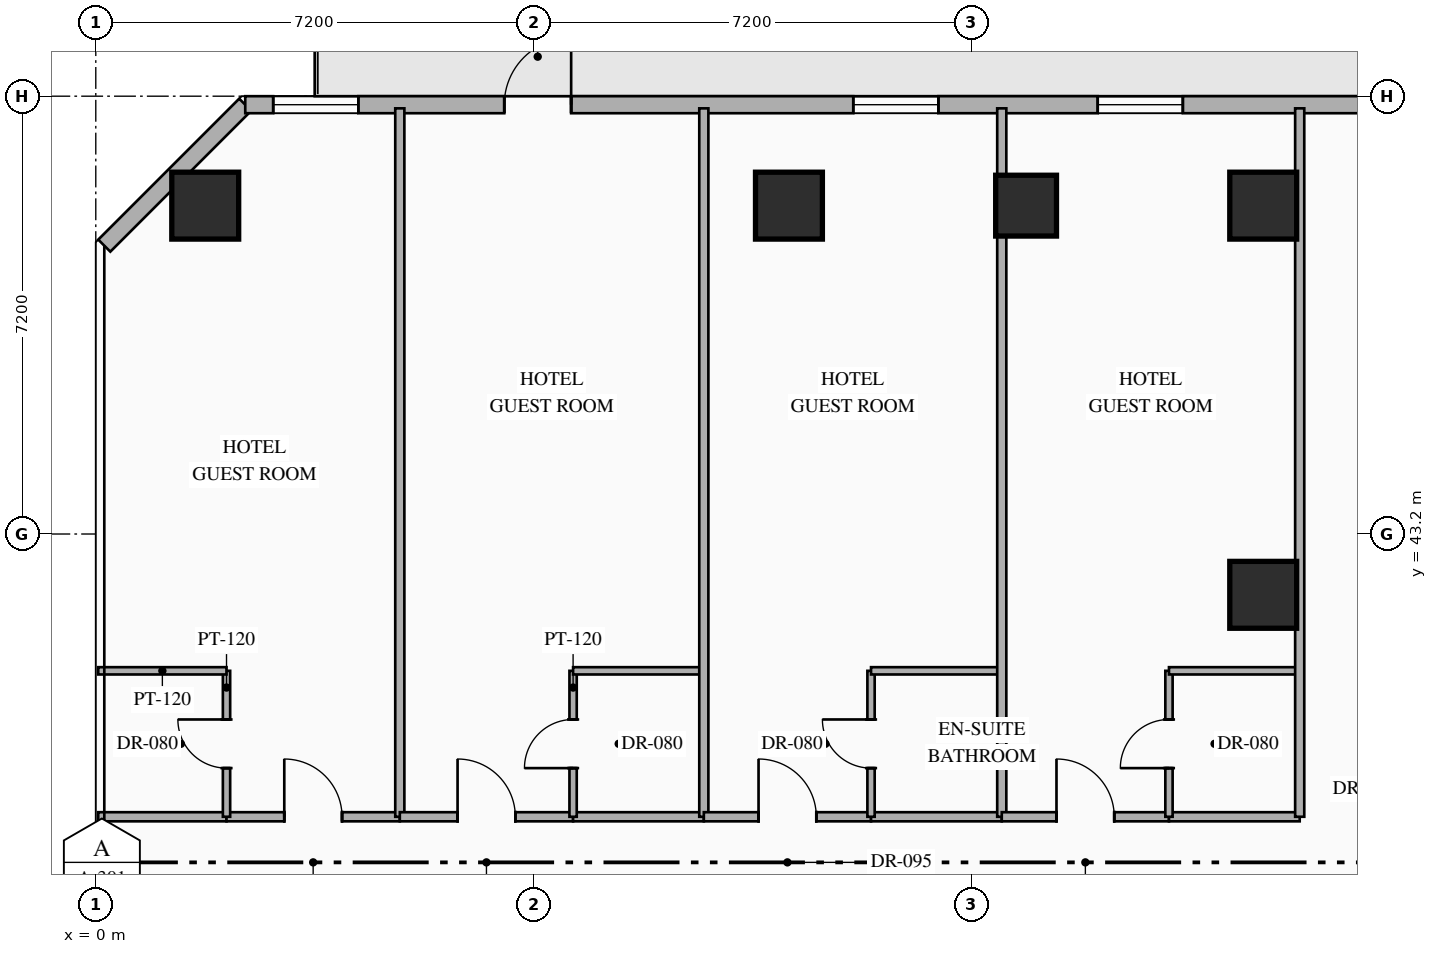
"""IFC4 building model, lengths in metres.
Left out: names, types, materials, properties, quantities, classifications, styles, units other than length and angle.
Written with IfcOpenShell. Run it as: python <this file> out.ifc"""

import sys

from ifc_helpers import new_model, si_unit, direction, frame, frame_2d, origin, origin_2d, place, context, subcontext, project, spatial, rectangle, hollow_rectangle, extrude, element, fill, save


model = new_model("IFC4")
c1 = context("Model", 3, precision=1e-05, world=origin(), true_north=direction((0.0, 1.0)))
c2 = subcontext(c1, "Body", "Model", "MODEL_VIEW")
j1 = project(units=[si_unit("LENGTHUNIT", "METRE"), si_unit("PLANEANGLEUNIT", "RADIAN")], contexts=[c1])
p1 = place(None, origin())
s1 = spatial("IfcSite", under=j1, at=p1, CompositionType="ELEMENT")
p2 = place(p1, origin())
s2 = spatial("IfcBuilding", under=s1, at=p2, CompositionType="ELEMENT")
p3 = place(p2, frame((0.0, 0.0, 46.65)))
s3 = spatial("IfcBuildingStorey", under=s2, at=p3, CompositionType="ELEMENT", Elevation=46.65)
for number, where, z_axis, x_axis in (
    (1, (1.8, 48.6, 0.0), (0.0, 0.0, 1.0), (1.0, 0.0, 0.0)),
    (2, (11.4, 48.6, 0.0), (0.0, 0.0, 1.0), (1.0, 0.0, 0.0)),
    (3, (19.2, 48.6, 0.0), (0.0, 0.0, 1.0), (1.0, 0.0, 0.0)),
    (4, (19.2, 42.2, 0.0), (0.0, 0.0, 1.0), (1.0, 0.0, 0.0)),
):
    element("IfcColumn", number, at=place(p3, frame(where, z_axis=z_axis, x_axis=x_axis)), inside=s3, PredefinedType="COLUMN", context=c2, shape_type="SweptSolid", body=[
        extrude(hollow_rectangle(XDim=1.1, YDim=1.1, WallThickness=0.04, at=origin_2d()), origin(), (0.0, 0.0, 1.0), 3.35),
    ])
p4 = place(p3, frame((15.3, 48.6, 0.0), z_axis=(0.0, 0.0, 1.0), x_axis=(1.0, 0.0, 0.0)))
e5 = element("IfcColumn", 5, at=p4, inside=s3, PredefinedType="COLUMN", context=c2, shape_type="SweptSolid", body=[
    extrude(hollow_rectangle(XDim=1.0, YDim=1.0, WallThickness=0.038, at=origin_2d()), origin(), (0.0, 0.0, 1.0), 3.35),
])
p5 = place(p3, frame((0.14, 47.942, 0.0), z_axis=(0.0, 0.0, 1.0), x_axis=(0.707106781187, 0.707106781187, 0.0)))
e6 = element("IfcWall", 6, at=p5, inside=s3, PredefinedType="STANDARD", context=c2, shape_type="SweptSolid", body=[
    extrude(rectangle(XDim=3.278, YDim=0.28, at=frame_2d((1.639, 0.0))), origin(), (0.0, 0.0, 1.0), 3.13),
])
p6 = place(p3, frame((2.458, 50.26, 0.0), z_axis=(0.0, 0.0, 1.0), x_axis=(1.0, 0.0, 0.0)))
e7 = element("IfcWall", 7, at=p6, inside=s3, PredefinedType="STANDARD", context=c2, shape_type="SweptSolid", body=[
    extrude(rectangle(XDim=40.084, YDim=0.28, at=frame_2d((20.042, 0.0))), origin(), (0.0, 0.0, 1.0), 3.13),
])
p7 = place(p6, frame((4.26, 0.0, 0.0)))
e8 = element("IfcOpeningElement", 8, at=p7, cuts=e7, PredefinedType="OPENING", context=c2, shape_type="SweptSolid", body=[
    extrude(rectangle(XDim=1.1, YDim=2.2, at=frame_2d((0.55, 1.1))), frame((0.0, 0.15, 0.0), z_axis=(0.0, -1.0, 0.0), x_axis=(1.0, 0.0, 0.0)), (0.0, 0.0, 1.0), 0.3),
])
p8 = place(p6, frame((0.46, 0.0, 0.85)))
e9 = element("IfcOpeningElement", 9, at=p8, cuts=e7, PredefinedType="OPENING", context=c2, shape_type="SweptSolid", body=[
    extrude(rectangle(XDim=1.4, YDim=1.8, at=frame_2d((0.7, 0.9))), frame((0.0, 0.15, 0.0), z_axis=(0.0, -1.0, 0.0), x_axis=(1.0, 0.0, 0.0)), (0.0, 0.0, 1.0), 0.3),
])
p9 = place(p6, frame((10.0, 0.0, 0.85)))
e10 = element("IfcOpeningElement", 10, at=p9, cuts=e7, PredefinedType="OPENING", context=c2, shape_type="SweptSolid", body=[
    extrude(rectangle(XDim=1.4, YDim=1.8, at=frame_2d((0.7, 0.9))), frame((0.0, 0.15, 0.0), z_axis=(0.0, -1.0, 0.0), x_axis=(1.0, 0.0, 0.0)), (0.0, 0.0, 1.0), 0.3),
])
p10 = place(p6, frame((14.02, 0.0, 0.85)))
e11 = element("IfcOpeningElement", 11, at=p10, cuts=e7, PredefinedType="OPENING", context=c2, shape_type="SweptSolid", body=[
    extrude(rectangle(XDim=1.4, YDim=1.8, at=frame_2d((0.7, 0.9))), frame((0.0, 0.15, 0.0), z_axis=(0.0, -1.0, 0.0), x_axis=(1.0, 0.0, 0.0)), (0.0, 0.0, 1.0), 0.3),
])
p11 = place(p6, frame((20.789, 0.0, 0.85)))
e12 = element("IfcOpeningElement", 12, at=p11, cuts=e7, PredefinedType="OPENING", context=c2, shape_type="SweptSolid", body=[
    extrude(rectangle(XDim=1.4, YDim=1.8, at=frame_2d((0.7, 0.9))), frame((0.0, 0.15, 0.0), z_axis=(0.0, -1.0, 0.0), x_axis=(1.0, 0.0, 0.0)), (0.0, 0.0, 1.0), 0.3),
])
p12 = place(p6, frame((24.664, 0.0, 0.85)))
e13 = element("IfcOpeningElement", 13, at=p12, cuts=e7, PredefinedType="OPENING", context=c2, shape_type="SweptSolid", body=[
    extrude(rectangle(XDim=1.4, YDim=1.8, at=frame_2d((0.7, 0.9))), frame((0.0, 0.15, 0.0), z_axis=(0.0, -1.0, 0.0), x_axis=(1.0, 0.0, 0.0)), (0.0, 0.0, 1.0), 0.3),
])
p13 = place(p6, frame((26.803, 0.0, 0.85)))
e14 = element("IfcOpeningElement", 14, at=p13, cuts=e7, PredefinedType="OPENING", context=c2, shape_type="SweptSolid", body=[
    extrude(rectangle(XDim=1.4, YDim=1.8, at=frame_2d((0.7, 0.9))), frame((0.0, 0.15, 0.0), z_axis=(0.0, -1.0, 0.0), x_axis=(1.0, 0.0, 0.0)), (0.0, 0.0, 1.0), 0.3),
])
p14 = place(p6, frame((32.703, 0.0, 0.85)))
e15 = element("IfcOpeningElement", 15, at=p14, cuts=e7, PredefinedType="OPENING", context=c2, shape_type="SweptSolid", body=[
    extrude(rectangle(XDim=1.4, YDim=1.8, at=frame_2d((0.7, 0.9))), frame((0.0, 0.15, 0.0), z_axis=(0.0, -1.0, 0.0), x_axis=(1.0, 0.0, 0.0)), (0.0, 0.0, 1.0), 0.3),
])
p15 = place(p6, frame((36.967, 0.0, 0.85)))
e16 = element("IfcOpeningElement", 16, at=p15, cuts=e7, PredefinedType="OPENING", context=c2, shape_type="SweptSolid", body=[
    extrude(rectangle(XDim=1.4, YDim=1.8, at=frame_2d((0.7, 0.9))), frame((0.0, 0.15, 0.0), z_axis=(0.0, -1.0, 0.0), x_axis=(1.0, 0.0, 0.0)), (0.0, 0.0, 1.0), 0.3),
])
p16 = place(p3, frame((0.04, 38.55, 0.0), z_axis=(0.0, 0.0, 1.0), x_axis=(1.0, 0.0, 0.0)))
e17 = element("IfcWall", 17, at=p16, inside=s3, PredefinedType="PARTITIONING", context=c2, shape_type="SweptSolid", body=[
    extrude(rectangle(XDim=2.11, YDim=0.15, at=frame_2d((1.055, 0.0))), origin(), (0.0, 0.0, 1.0), 2.775),
])
p17 = place(p3, frame((2.15, 38.55, 0.0), z_axis=(0.0, 0.0, 1.0), x_axis=(1.0, 0.0, 0.0)))
e18 = element("IfcWall", 18, at=p17, inside=s3, PredefinedType="PARTITIONING", context=c2, shape_type="SweptSolid", body=[
    extrude(rectangle(XDim=2.85, YDim=0.15, at=frame_2d((1.425, 0.0))), origin(), (0.0, 0.0, 1.0), 2.775),
])
p18 = place(p17, frame((0.95, 0.0, 0.0)))
e19 = element("IfcOpeningElement", 19, at=p18, cuts=e18, PredefinedType="OPENING", context=c2, shape_type="SweptSolid", body=[
    extrude(rectangle(XDim=0.95, YDim=2.15, at=frame_2d((0.475, 1.075))), frame((0.0, 0.085, 0.0), z_axis=(0.0, -1.0, 0.0), x_axis=(1.0, 0.0, 0.0)), (0.0, 0.0, 1.0), 0.17),
])
p19 = place(p3, frame((2.15, 38.55, 0.0), z_axis=(0.0, 0.0, 1.0), x_axis=(0.0, 1.0, 0.0)))
e20 = element("IfcWall", 20, at=p19, inside=s3, PredefinedType="PARTITIONING", context=c2, shape_type="SweptSolid", body=[
    extrude(rectangle(XDim=2.4, YDim=0.12, at=frame_2d((1.2, 0.0))), origin(), (0.0, 0.0, 1.0), 3.13),
])
p20 = place(p19, frame((0.8, 0.0, 0.0)))
e21 = element("IfcOpeningElement", 21, at=p20, cuts=e20, PredefinedType="OPENING", context=c2, shape_type="SweptSolid", body=[
    extrude(rectangle(XDim=0.8, YDim=2.06, at=frame_2d((0.4, 1.03))), frame((0.0, 0.07, 0.0), z_axis=(0.0, -1.0, 0.0), x_axis=(1.0, 0.0, 0.0)), (0.0, 0.0, 1.0), 0.14),
])
p21 = place(p3, frame((0.04, 40.95, 0.0), z_axis=(0.0, 0.0, 1.0), x_axis=(1.0, 0.0, 0.0)))
e22 = element("IfcWall", 22, at=p21, inside=s3, PredefinedType="PARTITIONING", context=c2, shape_type="SweptSolid", body=[
    extrude(rectangle(XDim=2.11, YDim=0.12, at=frame_2d((1.055, 0.0))), origin(), (0.0, 0.0, 1.0), 2.775),
])
p22 = place(p3, frame((5.0, 38.55, 0.0), z_axis=(0.0, 0.0, 1.0), x_axis=(0.0, 1.0, 0.0)))
e23 = element("IfcWall", 23, at=p22, inside=s3, PredefinedType="PARTITIONING", context=c2, shape_type="SweptSolid", body=[
    extrude(rectangle(XDim=11.65, YDim=0.15, at=frame_2d((5.825, 0.0))), origin(), (0.0, 0.0, 1.0), 3.13),
])
p23 = place(p3, frame((5.0, 38.55, 0.0), z_axis=(0.0, 0.0, 1.0), x_axis=(1.0, 0.0, 0.0)))
e24 = element("IfcWall", 24, at=p23, inside=s3, PredefinedType="PARTITIONING", context=c2, shape_type="SweptSolid", body=[
    extrude(rectangle(XDim=2.85, YDim=0.15, at=frame_2d((1.425, 0.0))), origin(), (0.0, 0.0, 1.0), 2.775),
])
p24 = place(p23, frame((0.95, 0.0, 0.0)))
e25 = element("IfcOpeningElement", 25, at=p24, cuts=e24, PredefinedType="OPENING", context=c2, shape_type="SweptSolid", body=[
    extrude(rectangle(XDim=0.95, YDim=2.15, at=frame_2d((0.475, 1.075))), frame((0.0, 0.085, 0.0), z_axis=(0.0, -1.0, 0.0), x_axis=(1.0, 0.0, 0.0)), (0.0, 0.0, 1.0), 0.17),
])
p25 = place(p3, frame((7.85, 38.55, 0.0), z_axis=(0.0, 0.0, 1.0), x_axis=(1.0, 0.0, 0.0)))
e26 = element("IfcWall", 26, at=p25, inside=s3, PredefinedType="PARTITIONING", context=c2, shape_type="SweptSolid", body=[
    extrude(rectangle(XDim=2.15, YDim=0.15, at=frame_2d((1.075, 0.0))), origin(), (0.0, 0.0, 1.0), 2.775),
])
p26 = place(p3, frame((7.85, 38.55, 0.0), z_axis=(0.0, 0.0, 1.0), x_axis=(0.0, 1.0, 0.0)))
e27 = element("IfcWall", 27, at=p26, inside=s3, PredefinedType="PARTITIONING", context=c2, shape_type="SweptSolid", body=[
    extrude(rectangle(XDim=2.4, YDim=0.12, at=frame_2d((1.2, 0.0))), origin(), (0.0, 0.0, 1.0), 3.13),
])
p27 = place(p26, frame((0.8, 0.0, 0.0)))
e28 = element("IfcOpeningElement", 28, at=p27, cuts=e27, PredefinedType="OPENING", context=c2, shape_type="SweptSolid", body=[
    extrude(rectangle(XDim=0.8, YDim=2.06, at=frame_2d((0.4, 1.03))), frame((0.0, 0.07, 0.0), z_axis=(0.0, -1.0, 0.0), x_axis=(1.0, 0.0, 0.0)), (0.0, 0.0, 1.0), 0.14),
])
p28 = place(p3, frame((7.85, 40.95, 0.0), z_axis=(0.0, 0.0, 1.0), x_axis=(1.0, 0.0, 0.0)))
e29 = element("IfcWall", 29, at=p28, inside=s3, PredefinedType="PARTITIONING", context=c2, shape_type="SweptSolid", body=[
    extrude(rectangle(XDim=2.15, YDim=0.12, at=frame_2d((1.075, 0.0))), origin(), (0.0, 0.0, 1.0), 2.775),
])
p29 = place(p3, frame((10.0, 38.55, 0.0), z_axis=(0.0, 0.0, 1.0), x_axis=(0.0, 1.0, 0.0)))
e30 = element("IfcWall", 30, at=p29, inside=s3, PredefinedType="PARTITIONING", context=c2, shape_type="SweptSolid", body=[
    extrude(rectangle(XDim=11.65, YDim=0.15, at=frame_2d((5.825, 0.0))), origin(), (0.0, 0.0, 1.0), 3.13),
])
p30 = place(p3, frame((10.0, 38.55, 0.0), z_axis=(0.0, 0.0, 1.0), x_axis=(1.0, 0.0, 0.0)))
e31 = element("IfcWall", 31, at=p30, inside=s3, PredefinedType="PARTITIONING", context=c2, shape_type="SweptSolid", body=[
    extrude(rectangle(XDim=2.75, YDim=0.15, at=frame_2d((1.375, 0.0))), origin(), (0.0, 0.0, 1.0), 2.775),
])
p31 = place(p30, frame((0.9, 0.0, 0.0)))
e32 = element("IfcOpeningElement", 32, at=p31, cuts=e31, PredefinedType="OPENING", context=c2, shape_type="SweptSolid", body=[
    extrude(rectangle(XDim=0.95, YDim=2.15, at=frame_2d((0.475, 1.075))), frame((0.0, 0.085, 0.0), z_axis=(0.0, -1.0, 0.0), x_axis=(1.0, 0.0, 0.0)), (0.0, 0.0, 1.0), 0.17),
])
p32 = place(p3, frame((12.75, 38.55, 0.0), z_axis=(0.0, 0.0, 1.0), x_axis=(1.0, 0.0, 0.0)))
e33 = element("IfcWall", 33, at=p32, inside=s3, PredefinedType="PARTITIONING", context=c2, shape_type="SweptSolid", body=[
    extrude(rectangle(XDim=2.15, YDim=0.15, at=frame_2d((1.075, 0.0))), origin(), (0.0, 0.0, 1.0), 2.775),
])
p33 = place(p3, frame((12.75, 38.55, 0.0), z_axis=(0.0, 0.0, 1.0), x_axis=(0.0, 1.0, 0.0)))
e34 = element("IfcWall", 34, at=p33, inside=s3, PredefinedType="PARTITIONING", context=c2, shape_type="SweptSolid", body=[
    extrude(rectangle(XDim=2.4, YDim=0.12, at=frame_2d((1.2, 0.0))), origin(), (0.0, 0.0, 1.0), 3.13),
])
p34 = place(p33, frame((0.8, 0.0, 0.0)))
e35 = element("IfcOpeningElement", 35, at=p34, cuts=e34, PredefinedType="OPENING", context=c2, shape_type="SweptSolid", body=[
    extrude(rectangle(XDim=0.8, YDim=2.06, at=frame_2d((0.4, 1.03))), frame((0.0, 0.07, 0.0), z_axis=(0.0, -1.0, 0.0), x_axis=(1.0, 0.0, 0.0)), (0.0, 0.0, 1.0), 0.14),
])
p35 = place(p3, frame((12.75, 40.95, 0.0), z_axis=(0.0, 0.0, 1.0), x_axis=(1.0, 0.0, 0.0)))
e36 = element("IfcWall", 36, at=p35, inside=s3, PredefinedType="PARTITIONING", context=c2, shape_type="SweptSolid", body=[
    extrude(rectangle(XDim=2.15, YDim=0.12, at=frame_2d((1.075, 0.0))), origin(), (0.0, 0.0, 1.0), 2.775),
])
p36 = place(p3, frame((14.9, 38.55, 0.0), z_axis=(0.0, 0.0, 1.0), x_axis=(0.0, 1.0, 0.0)))
e37 = element("IfcWall", 37, at=p36, inside=s3, PredefinedType="PARTITIONING", context=c2, shape_type="SweptSolid", body=[
    extrude(rectangle(XDim=11.65, YDim=0.15, at=frame_2d((5.825, 0.0))), origin(), (0.0, 0.0, 1.0), 3.13),
])
p37 = place(p3, frame((14.9, 38.55, 0.0), z_axis=(0.0, 0.0, 1.0), x_axis=(1.0, 0.0, 0.0)))
e38 = element("IfcWall", 38, at=p37, inside=s3, PredefinedType="PARTITIONING", context=c2, shape_type="SweptSolid", body=[
    extrude(rectangle(XDim=2.75, YDim=0.15, at=frame_2d((1.375, 0.0))), origin(), (0.0, 0.0, 1.0), 2.775),
])
p38 = place(p37, frame((0.9, 0.0, 0.0)))
e39 = element("IfcOpeningElement", 39, at=p38, cuts=e38, PredefinedType="OPENING", context=c2, shape_type="SweptSolid", body=[
    extrude(rectangle(XDim=0.95, YDim=2.15, at=frame_2d((0.475, 1.075))), frame((0.0, 0.085, 0.0), z_axis=(0.0, -1.0, 0.0), x_axis=(1.0, 0.0, 0.0)), (0.0, 0.0, 1.0), 0.17),
])
p39 = place(p3, frame((17.65, 38.55, 0.0), z_axis=(0.0, 0.0, 1.0), x_axis=(1.0, 0.0, 0.0)))
e40 = element("IfcWall", 40, at=p39, inside=s3, PredefinedType="PARTITIONING", context=c2, shape_type="SweptSolid", body=[
    extrude(rectangle(XDim=2.15, YDim=0.15, at=frame_2d((1.075, 0.0))), origin(), (0.0, 0.0, 1.0), 2.775),
])
p40 = place(p3, frame((17.65, 38.55, 0.0), z_axis=(0.0, 0.0, 1.0), x_axis=(0.0, 1.0, 0.0)))
e41 = element("IfcWall", 41, at=p40, inside=s3, PredefinedType="PARTITIONING", context=c2, shape_type="SweptSolid", body=[
    extrude(rectangle(XDim=2.4, YDim=0.12, at=frame_2d((1.2, 0.0))), origin(), (0.0, 0.0, 1.0), 3.13),
])
p41 = place(p40, frame((0.8, 0.0, 0.0)))
e42 = element("IfcOpeningElement", 42, at=p41, cuts=e41, PredefinedType="OPENING", context=c2, shape_type="SweptSolid", body=[
    extrude(rectangle(XDim=0.8, YDim=2.06, at=frame_2d((0.4, 1.03))), frame((0.0, 0.07, 0.0), z_axis=(0.0, -1.0, 0.0), x_axis=(1.0, 0.0, 0.0)), (0.0, 0.0, 1.0), 0.14),
])
p42 = place(p3, frame((17.65, 40.95, 0.0), z_axis=(0.0, 0.0, 1.0), x_axis=(1.0, 0.0, 0.0)))
e43 = element("IfcWall", 43, at=p42, inside=s3, PredefinedType="PARTITIONING", context=c2, shape_type="SweptSolid", body=[
    extrude(rectangle(XDim=2.15, YDim=0.12, at=frame_2d((1.075, 0.0))), origin(), (0.0, 0.0, 1.0), 2.775),
])
p43 = place(p3, frame((19.8, 38.55, 0.0), z_axis=(0.0, 0.0, 1.0), x_axis=(0.0, 1.0, 0.0)))
e44 = element("IfcWall", 44, at=p43, inside=s3, PredefinedType="PARTITIONING", context=c2, shape_type="SweptSolid", body=[
    extrude(rectangle(XDim=11.65, YDim=0.15, at=frame_2d((5.825, 0.0))), origin(), (0.0, 0.0, 1.0), 3.13),
])
p44 = place(p7, origin())
e45 = element("IfcDoor", 45, at=p44, inside=s3, OperationType="SINGLE_SWING_RIGHT", PredefinedType="DOOR", context=c2, shape_type="SweptSolid", body=[
    extrude(rectangle(XDim=1.1, YDim=2.2, at=frame_2d((0.55, 1.1))), frame((0.0, 0.025, 0.0), z_axis=(0.0, -1.0, 0.0), x_axis=(1.0, 0.0, 0.0)), (0.0, 0.0, 1.0), 0.05),
])
fill(e8, e45)
p45 = place(p8, origin())
e46 = element("IfcWindow", 46, at=p45, inside=s3, PartitioningType="SINGLE_PANEL", PredefinedType="WINDOW", context=c2, shape_type="SweptSolid", body=[
    extrude(rectangle(XDim=1.4, YDim=1.8, at=frame_2d((0.7, 0.9))), frame((0.0, 0.03, 0.0), z_axis=(0.0, -1.0, 0.0), x_axis=(1.0, 0.0, 0.0)), (0.0, 0.0, 1.0), 0.06),
])
fill(e9, e46)
p46 = place(p9, origin())
e47 = element("IfcWindow", 47, at=p46, inside=s3, PartitioningType="SINGLE_PANEL", PredefinedType="WINDOW", context=c2, shape_type="SweptSolid", body=[
    extrude(rectangle(XDim=1.4, YDim=1.8, at=frame_2d((0.7, 0.9))), frame((0.0, 0.03, 0.0), z_axis=(0.0, -1.0, 0.0), x_axis=(1.0, 0.0, 0.0)), (0.0, 0.0, 1.0), 0.06),
])
fill(e10, e47)
p47 = place(p10, origin())
e48 = element("IfcWindow", 48, at=p47, inside=s3, PartitioningType="SINGLE_PANEL", PredefinedType="WINDOW", context=c2, shape_type="SweptSolid", body=[
    extrude(rectangle(XDim=1.4, YDim=1.8, at=frame_2d((0.7, 0.9))), frame((0.0, 0.03, 0.0), z_axis=(0.0, -1.0, 0.0), x_axis=(1.0, 0.0, 0.0)), (0.0, 0.0, 1.0), 0.06),
])
fill(e11, e48)
p48 = place(p18, origin())
e49 = element("IfcDoor", 49, at=p48, inside=s3, OperationType="SINGLE_SWING_LEFT", PredefinedType="DOOR", context=c2, shape_type="SweptSolid", body=[
    extrude(rectangle(XDim=0.95, YDim=2.15, at=frame_2d((0.475, 1.075))), frame((0.0, 0.025, 0.0), z_axis=(0.0, -1.0, 0.0), x_axis=(1.0, 0.0, 0.0)), (0.0, 0.0, 1.0), 0.05),
])
fill(e19, e49)
p49 = place(p20, origin())
e50 = element("IfcDoor", 50, at=p49, inside=s3, OperationType="SINGLE_SWING_RIGHT", PredefinedType="DOOR", context=c2, shape_type="SweptSolid", body=[
    extrude(rectangle(XDim=0.8, YDim=2.06, at=frame_2d((0.4, 1.03))), frame((0.0, 0.025, 0.0), z_axis=(0.0, -1.0, 0.0), x_axis=(1.0, 0.0, 0.0)), (0.0, 0.0, 1.0), 0.05),
])
fill(e21, e50)
p50 = place(p24, origin())
e51 = element("IfcDoor", 51, at=p50, inside=s3, OperationType="SINGLE_SWING_LEFT", PredefinedType="DOOR", context=c2, shape_type="SweptSolid", body=[
    extrude(rectangle(XDim=0.95, YDim=2.15, at=frame_2d((0.475, 1.075))), frame((0.0, 0.025, 0.0), z_axis=(0.0, -1.0, 0.0), x_axis=(1.0, 0.0, 0.0)), (0.0, 0.0, 1.0), 0.05),
])
fill(e25, e51)
p51 = place(p27, origin())
e52 = element("IfcDoor", 52, at=p51, inside=s3, OperationType="SINGLE_SWING_LEFT", PredefinedType="DOOR", context=c2, shape_type="SweptSolid", body=[
    extrude(rectangle(XDim=0.8, YDim=2.06, at=frame_2d((0.4, 1.03))), frame((0.0, 0.025, 0.0), z_axis=(0.0, -1.0, 0.0), x_axis=(1.0, 0.0, 0.0)), (0.0, 0.0, 1.0), 0.05),
])
fill(e28, e52)
p52 = place(p31, origin())
e53 = element("IfcDoor", 53, at=p52, inside=s3, OperationType="SINGLE_SWING_LEFT", PredefinedType="DOOR", context=c2, shape_type="SweptSolid", body=[
    extrude(rectangle(XDim=0.95, YDim=2.15, at=frame_2d((0.475, 1.075))), frame((0.0, 0.025, 0.0), z_axis=(0.0, -1.0, 0.0), x_axis=(1.0, 0.0, 0.0)), (0.0, 0.0, 1.0), 0.05),
])
fill(e32, e53)
p53 = place(p34, origin())
e54 = element("IfcDoor", 54, at=p53, inside=s3, OperationType="SINGLE_SWING_RIGHT", PredefinedType="DOOR", context=c2, shape_type="SweptSolid", body=[
    extrude(rectangle(XDim=0.8, YDim=2.06, at=frame_2d((0.4, 1.03))), frame((0.0, 0.025, 0.0), z_axis=(0.0, -1.0, 0.0), x_axis=(1.0, 0.0, 0.0)), (0.0, 0.0, 1.0), 0.05),
])
fill(e35, e54)
p54 = place(p38, origin())
e55 = element("IfcDoor", 55, at=p54, inside=s3, OperationType="SINGLE_SWING_LEFT", PredefinedType="DOOR", context=c2, shape_type="SweptSolid", body=[
    extrude(rectangle(XDim=0.95, YDim=2.15, at=frame_2d((0.475, 1.075))), frame((0.0, 0.025, 0.0), z_axis=(0.0, -1.0, 0.0), x_axis=(1.0, 0.0, 0.0)), (0.0, 0.0, 1.0), 0.05),
])
fill(e39, e55)
p55 = place(p41, origin())
e56 = element("IfcDoor", 56, at=p55, inside=s3, OperationType="SINGLE_SWING_LEFT", PredefinedType="DOOR", context=c2, shape_type="SweptSolid", body=[
    extrude(rectangle(XDim=0.8, YDim=2.06, at=frame_2d((0.4, 1.03))), frame((0.0, 0.025, 0.0), z_axis=(0.0, -1.0, 0.0), x_axis=(1.0, 0.0, 0.0)), (0.0, 0.0, 1.0), 0.05),
])
fill(e42, e56)
save(model, sys.argv[1])
